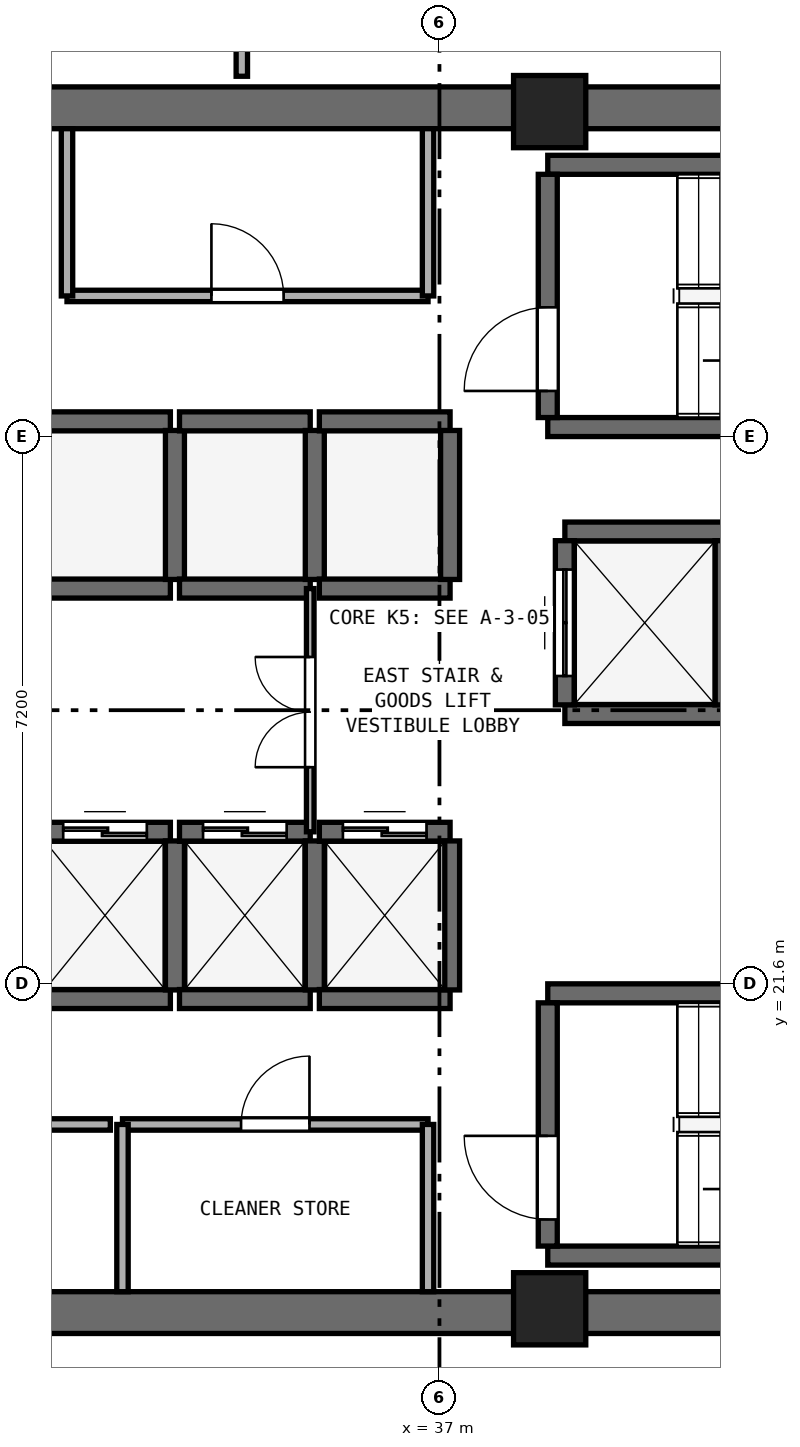
"""IFC4 building model, lengths in metres.
Left out: names, types, materials, properties, quantities, classifications, styles, units other than length and angle.
Written with IfcOpenShell. Run it as: python <this file> out.ifc"""

import sys

from ifc_helpers import new_model, si_unit, direction, frame, frame_2d, origin, origin_2d, place, context, subcontext, project, spatial, rectangle, extrude, element, fill, save


model = new_model("IFC4")
c1 = context("Model", 3, precision=1e-05, world=origin(), true_north=direction((0.0, 1.0)))
c2 = subcontext(c1, "Body", "Model", "MODEL_VIEW")
j1 = project(units=[si_unit("LENGTHUNIT", "METRE"), si_unit("PLANEANGLEUNIT", "RADIAN")], contexts=[c1])
p1 = place(None, origin())
s1 = spatial("IfcSite", under=j1, at=p1, CompositionType="ELEMENT")
p2 = place(p1, origin())
s2 = spatial("IfcBuilding", under=s1, at=p2, CompositionType="ELEMENT")
p3 = place(p2, frame((0.0, 0.0, 189.6)))
s3 = spatial("IfcBuildingStorey", under=s2, at=p3, CompositionType="ELEMENT", Elevation=189.6)
for number, where, z_axis, x_axis in (
    (1, (25.4, 17.275, 0.0), (0.0, 0.0, 1.0), (1.0, 0.0, 0.0)),
    (2, (25.4, 33.125, 0.0), (0.0, 0.0, 1.0), (1.0, 0.0, 0.0)),
):
    element("IfcWall", number, at=place(p3, frame(where, z_axis=z_axis, x_axis=x_axis)), inside=s3, PredefinedType="SHEAR", context=c2, shape_type="SweptSolid", body=[
        extrude(rectangle(XDim=23.2, YDim=0.55, at=frame_2d((11.6, 0.0))), origin(), (0.0, 0.0, 1.0), 3.54),
    ])
for number, where, z_axis, x_axis in (
    (3, (38.45, 17.325, 0.0), (0.0, 0.0, 1.0), (1.0, 0.0, 0.0)),
    (4, (38.45, 33.075, 0.0), (0.0, 0.0, 1.0), (1.0, 0.0, 0.0)),
):
    element("IfcColumn", number, at=place(p3, frame(where, z_axis=z_axis, x_axis=x_axis)), inside=s3, PredefinedType="PILASTER", context=c2, shape_type="SweptSolid", body=[
        extrude(rectangle(XDim=0.95, YDim=0.95, at=origin_2d()), origin(), (0.0, 0.0, 1.0), 3.8),
    ])
for number, where, z_axis, x_axis in (
    (5, (38.425, 28.925, 0.0), (0.0, 0.0, 1.0), (1.0, 0.0, 0.0)),
    (6, (38.425, 32.375, 0.0), (0.0, 0.0, 1.0), (1.0, 0.0, 0.0)),
):
    element("IfcWall", number, at=place(p3, frame(where, z_axis=z_axis, x_axis=x_axis)), inside=s3, PredefinedType="SHEAR", context=c2, shape_type="SweptSolid", body=[
        extrude(rectangle(XDim=7.3, YDim=0.25, at=frame_2d((3.65, 0.0))), origin(), (0.0, 0.0, 1.0), 3.54),
    ])
p4 = place(p3, frame((38.425, 29.05, 0.0), z_axis=(0.0, 0.0, 1.0), x_axis=(0.0, 1.0, 0.0)))
e7 = element("IfcWall", 7, at=p4, inside=s3, PredefinedType="SHEAR", context=c2, shape_type="SweptSolid", body=[
    extrude(rectangle(XDim=3.2, YDim=0.25, at=frame_2d((1.6, 0.0))), origin(), (0.0, 0.0, 1.0), 3.54),
])
p5 = place(p4, frame((0.35, 0.0, 0.0)))
e8 = element("IfcOpeningElement", 8, at=p5, cuts=e7, PredefinedType="OPENING", context=c2, shape_type="SweptSolid", body=[
    extrude(rectangle(XDim=1.1, YDim=2.15, at=frame_2d((0.55, 1.075))), frame((0.0, 0.135, 0.0), z_axis=(0.0, -1.0, 0.0), x_axis=(1.0, 0.0, 0.0)), (0.0, 0.0, 1.0), 0.27),
])
for number, where, z_axis, x_axis in (
    (9, (38.425, 18.025, 0.0), (0.0, 0.0, 1.0), (1.0, 0.0, 0.0)),
    (10, (38.425, 21.475, 0.0), (0.0, 0.0, 1.0), (1.0, 0.0, 0.0)),
):
    element("IfcWall", number, at=place(p3, frame(where, z_axis=z_axis, x_axis=x_axis)), inside=s3, PredefinedType="SHEAR", context=c2, shape_type="SweptSolid", body=[
        extrude(rectangle(XDim=7.3, YDim=0.25, at=frame_2d((3.65, 0.0))), origin(), (0.0, 0.0, 1.0), 3.54),
    ])
p6 = place(p3, frame((38.425, 18.15, 0.0), z_axis=(0.0, 0.0, 1.0), x_axis=(0.0, 1.0, 0.0)))
e11 = element("IfcWall", 11, at=p6, inside=s3, PredefinedType="SHEAR", context=c2, shape_type="SweptSolid", body=[
    extrude(rectangle(XDim=3.2, YDim=0.25, at=frame_2d((1.6, 0.0))), origin(), (0.0, 0.0, 1.0), 3.54),
])
p7 = place(p6, frame((0.35, 0.0, 0.0)))
e12 = element("IfcOpeningElement", 12, at=p7, cuts=e11, PredefinedType="OPENING", context=c2, shape_type="SweptSolid", body=[
    extrude(rectangle(XDim=1.1, YDim=2.15, at=frame_2d((0.55, 1.075))), frame((0.0, 0.135, 0.0), z_axis=(0.0, -1.0, 0.0), x_axis=(1.0, 0.0, 0.0)), (0.0, 0.0, 1.0), 0.27),
])
p8 = place(p3, frame((31.74, 21.4, 0.0), z_axis=(0.0, 0.0, 1.0), x_axis=(1.0, 0.0, 0.0)))
e13 = element("IfcWall", 13, at=p8, inside=s3, PredefinedType="SHEAR", context=c2, shape_type="SweptSolid", body=[
    extrude(rectangle(XDim=1.72, YDim=0.25, at=frame_2d((0.86, 0.0))), origin(), (0.0, 0.0, 1.0), 3.54),
])
p9 = place(p3, frame((31.74, 23.6, 0.0), z_axis=(0.0, 0.0, 1.0), x_axis=(1.0, 0.0, 0.0)))
e14 = element("IfcWall", 14, at=p9, inside=s3, PredefinedType="SHEAR", context=c2, shape_type="SweptSolid", body=[
    extrude(rectangle(XDim=1.72, YDim=0.25, at=frame_2d((0.86, 0.0))), origin(), (0.0, 0.0, 1.0), 3.54),
])
p10 = place(p9, frame((0.31, 0.0, 0.0)))
e15 = element("IfcOpeningElement", 15, at=p10, cuts=e14, PredefinedType="OPENING", context=c2, shape_type="SweptSolid", body=[
    extrude(rectangle(XDim=1.1, YDim=2.15, at=frame_2d((0.55, 1.075))), frame((0.0, 0.135, 0.0), z_axis=(0.0, -1.0, 0.0), x_axis=(1.0, 0.0, 0.0)), (0.0, 0.0, 1.0), 0.27),
])
p11 = place(p3, frame((33.52, 21.52, 0.0), z_axis=(0.0, 0.0, 1.0), x_axis=(0.0, 1.0, 0.0)))
e16 = element("IfcWall", 16, at=p11, inside=s3, PredefinedType="SHEAR", context=c2, shape_type="SweptSolid", body=[
    extrude(rectangle(XDim=1.96, YDim=0.25, at=frame_2d((0.98, 0.0))), origin(), (0.0, 0.0, 1.0), 3.54),
])
p12 = place(p3, frame((33.58, 21.4, 0.0), z_axis=(0.0, 0.0, 1.0), x_axis=(1.0, 0.0, 0.0)))
e17 = element("IfcWall", 17, at=p12, inside=s3, PredefinedType="SHEAR", context=c2, shape_type="SweptSolid", body=[
    extrude(rectangle(XDim=1.72, YDim=0.25, at=frame_2d((0.86, 0.0))), origin(), (0.0, 0.0, 1.0), 3.54),
])
p13 = place(p3, frame((33.58, 23.6, 0.0), z_axis=(0.0, 0.0, 1.0), x_axis=(1.0, 0.0, 0.0)))
e18 = element("IfcWall", 18, at=p13, inside=s3, PredefinedType="SHEAR", context=c2, shape_type="SweptSolid", body=[
    extrude(rectangle(XDim=1.72, YDim=0.25, at=frame_2d((0.86, 0.0))), origin(), (0.0, 0.0, 1.0), 3.54),
])
p14 = place(p13, frame((0.31, 0.0, 0.0)))
e19 = element("IfcOpeningElement", 19, at=p14, cuts=e18, PredefinedType="OPENING", context=c2, shape_type="SweptSolid", body=[
    extrude(rectangle(XDim=1.1, YDim=2.15, at=frame_2d((0.55, 1.075))), frame((0.0, 0.135, 0.0), z_axis=(0.0, -1.0, 0.0), x_axis=(1.0, 0.0, 0.0)), (0.0, 0.0, 1.0), 0.27),
])
p15 = place(p3, frame((35.36, 21.52, 0.0), z_axis=(0.0, 0.0, 1.0), x_axis=(0.0, 1.0, 0.0)))
e20 = element("IfcWall", 20, at=p15, inside=s3, PredefinedType="SHEAR", context=c2, shape_type="SweptSolid", body=[
    extrude(rectangle(XDim=1.96, YDim=0.25, at=frame_2d((0.98, 0.0))), origin(), (0.0, 0.0, 1.0), 3.54),
])
p16 = place(p3, frame((35.42, 21.4, 0.0), z_axis=(0.0, 0.0, 1.0), x_axis=(1.0, 0.0, 0.0)))
e21 = element("IfcWall", 21, at=p16, inside=s3, PredefinedType="SHEAR", context=c2, shape_type="SweptSolid", body=[
    extrude(rectangle(XDim=1.72, YDim=0.25, at=frame_2d((0.86, 0.0))), origin(), (0.0, 0.0, 1.0), 3.54),
])
p17 = place(p3, frame((35.42, 23.6, 0.0), z_axis=(0.0, 0.0, 1.0), x_axis=(1.0, 0.0, 0.0)))
e22 = element("IfcWall", 22, at=p17, inside=s3, PredefinedType="SHEAR", context=c2, shape_type="SweptSolid", body=[
    extrude(rectangle(XDim=1.72, YDim=0.25, at=frame_2d((0.86, 0.0))), origin(), (0.0, 0.0, 1.0), 3.54),
])
p18 = place(p17, frame((0.31, 0.0, 0.0)))
e23 = element("IfcOpeningElement", 23, at=p18, cuts=e22, PredefinedType="OPENING", context=c2, shape_type="SweptSolid", body=[
    extrude(rectangle(XDim=1.1, YDim=2.15, at=frame_2d((0.55, 1.075))), frame((0.0, 0.135, 0.0), z_axis=(0.0, -1.0, 0.0), x_axis=(1.0, 0.0, 0.0)), (0.0, 0.0, 1.0), 0.27),
])
p19 = place(p3, frame((37.14, 21.52, 0.0), z_axis=(0.0, 0.0, 1.0), x_axis=(0.0, 1.0, 0.0)))
e24 = element("IfcWall", 24, at=p19, inside=s3, PredefinedType="SHEAR", context=c2, shape_type="SweptSolid", body=[
    extrude(rectangle(XDim=1.96, YDim=0.25, at=frame_2d((0.98, 0.0))), origin(), (0.0, 0.0, 1.0), 3.54),
])
for number, where, z_axis, x_axis in (
    (25, (31.74, 26.8, 0.0), (0.0, 0.0, 1.0), (1.0, 0.0, 0.0)),
    (26, (31.74, 29.0, 0.0), (0.0, 0.0, 1.0), (1.0, 0.0, 0.0)),
):
    element("IfcWall", number, at=place(p3, frame(where, z_axis=z_axis, x_axis=x_axis)), inside=s3, PredefinedType="SHEAR", context=c2, shape_type="SweptSolid", body=[
        extrude(rectangle(XDim=1.72, YDim=0.25, at=frame_2d((0.86, 0.0))), origin(), (0.0, 0.0, 1.0), 3.54),
    ])
p20 = place(p3, frame((33.52, 26.92, 0.0), z_axis=(0.0, 0.0, 1.0), x_axis=(0.0, 1.0, 0.0)))
e27 = element("IfcWall", 27, at=p20, inside=s3, PredefinedType="SHEAR", context=c2, shape_type="SweptSolid", body=[
    extrude(rectangle(XDim=1.96, YDim=0.25, at=frame_2d((0.98, 0.0))), origin(), (0.0, 0.0, 1.0), 3.54),
])
for number, where, z_axis, x_axis in (
    (28, (33.58, 26.8, 0.0), (0.0, 0.0, 1.0), (1.0, 0.0, 0.0)),
    (29, (33.58, 29.0, 0.0), (0.0, 0.0, 1.0), (1.0, 0.0, 0.0)),
):
    element("IfcWall", number, at=place(p3, frame(where, z_axis=z_axis, x_axis=x_axis)), inside=s3, PredefinedType="SHEAR", context=c2, shape_type="SweptSolid", body=[
        extrude(rectangle(XDim=1.72, YDim=0.25, at=frame_2d((0.86, 0.0))), origin(), (0.0, 0.0, 1.0), 3.54),
    ])
p21 = place(p3, frame((35.36, 26.92, 0.0), z_axis=(0.0, 0.0, 1.0), x_axis=(0.0, 1.0, 0.0)))
e30 = element("IfcWall", 30, at=p21, inside=s3, PredefinedType="SHEAR", context=c2, shape_type="SweptSolid", body=[
    extrude(rectangle(XDim=1.96, YDim=0.25, at=frame_2d((0.98, 0.0))), origin(), (0.0, 0.0, 1.0), 3.54),
])
for number, where, z_axis, x_axis in (
    (31, (35.42, 26.8, 0.0), (0.0, 0.0, 1.0), (1.0, 0.0, 0.0)),
    (32, (35.42, 29.0, 0.0), (0.0, 0.0, 1.0), (1.0, 0.0, 0.0)),
):
    element("IfcWall", number, at=place(p3, frame(where, z_axis=z_axis, x_axis=x_axis)), inside=s3, PredefinedType="SHEAR", context=c2, shape_type="SweptSolid", body=[
        extrude(rectangle(XDim=1.72, YDim=0.25, at=frame_2d((0.86, 0.0))), origin(), (0.0, 0.0, 1.0), 3.54),
    ])
p22 = place(p3, frame((37.14, 26.92, 0.0), z_axis=(0.0, 0.0, 1.0), x_axis=(0.0, 1.0, 0.0)))
e33 = element("IfcWall", 33, at=p22, inside=s3, PredefinedType="SHEAR", context=c2, shape_type="SweptSolid", body=[
    extrude(rectangle(XDim=1.96, YDim=0.25, at=frame_2d((0.98, 0.0))), origin(), (0.0, 0.0, 1.0), 3.54),
])
for number, where, z_axis, x_axis in (
    (34, (38.65, 25.15, 0.0), (0.0, 0.0, 1.0), (1.0, 0.0, 0.0)),
    (35, (38.65, 27.55, 0.0), (0.0, 0.0, 1.0), (1.0, 0.0, 0.0)),
):
    element("IfcWall", number, at=place(p3, frame(where, z_axis=z_axis, x_axis=x_axis)), inside=s3, PredefinedType="SHEAR", context=c2, shape_type="SweptSolid", body=[
        extrude(rectangle(XDim=2.1, YDim=0.25, at=frame_2d((1.05, 0.0))), origin(), (0.0, 0.0, 1.0), 3.54),
    ])
p23 = place(p3, frame((38.65, 25.27, 0.0), z_axis=(0.0, 0.0, 1.0), x_axis=(0.0, 1.0, 0.0)))
e36 = element("IfcWall", 36, at=p23, inside=s3, PredefinedType="SHEAR", context=c2, shape_type="SweptSolid", body=[
    extrude(rectangle(XDim=2.16, YDim=0.25, at=frame_2d((1.08, 0.0))), origin(), (0.0, 0.0, 1.0), 3.54),
])
p24 = place(p23, frame((0.38, 0.0, 0.0)))
e37 = element("IfcOpeningElement", 37, at=p24, cuts=e36, PredefinedType="OPENING", context=c2, shape_type="SweptSolid", body=[
    extrude(rectangle(XDim=1.4, YDim=2.2, at=frame_2d((0.7, 1.1))), frame((0.0, 0.135, 0.0), z_axis=(0.0, -1.0, 0.0), x_axis=(1.0, 0.0, 0.0)), (0.0, 0.0, 1.0), 0.27),
])
p25 = place(p3, frame((40.75, 25.27, 0.0), z_axis=(0.0, 0.0, 1.0), x_axis=(0.0, 1.0, 0.0)))
e38 = element("IfcWall", 38, at=p25, inside=s3, PredefinedType="SHEAR", context=c2, shape_type="SweptSolid", body=[
    extrude(rectangle(XDim=2.16, YDim=0.25, at=frame_2d((1.08, 0.0))), origin(), (0.0, 0.0, 1.0), 3.54),
])
p26 = place(p3, frame((32.1, 30.65, 0.0), z_axis=(0.0, 0.0, 1.0), x_axis=(1.0, 0.0, 0.0)))
e39 = element("IfcWall", 39, at=p26, inside=s3, PredefinedType="PARTITIONING", context=c2, shape_type="SweptSolid", body=[
    extrude(rectangle(XDim=4.75, YDim=0.15, at=frame_2d((2.375, 0.0))), origin(), (0.0, 0.0, 1.0), 3.54),
])
p27 = place(p26, frame((1.9, 0.0, 0.0)))
e40 = element("IfcOpeningElement", 40, at=p27, cuts=e39, PredefinedType="OPENING", context=c2, shape_type="SweptSolid", body=[
    extrude(rectangle(XDim=0.95, YDim=2.1, at=frame_2d((0.475, 1.05))), frame((0.0, 0.085, 0.0), z_axis=(0.0, -1.0, 0.0), x_axis=(1.0, 0.0, 0.0)), (0.0, 0.0, 1.0), 0.17),
])
for number, where, z_axis, x_axis in (
    (41, (32.1, 30.65, 0.0), (0.0, 0.0, 1.0), (0.0, 1.0, 0.0)),
    (42, (36.85, 30.65, 0.0), (0.0, 0.0, 1.0), (0.0, 1.0, 0.0)),
):
    element("IfcWall", number, at=place(p3, frame(where, z_axis=z_axis, x_axis=x_axis)), inside=s3, PredefinedType="PARTITIONING", context=c2, shape_type="SweptSolid", body=[
        extrude(rectangle(XDim=2.2, YDim=0.15, at=frame_2d((1.1, 0.0))), origin(), (0.0, 0.0, 1.0), 3.54),
    ])
p28 = place(p3, frame((29.43, 19.75, 0.0), z_axis=(0.0, 0.0, 1.0), x_axis=(1.0, 0.0, 0.0)))
e43 = element("IfcWall", 43, at=p28, inside=s3, PredefinedType="PARTITIONING", context=c2, shape_type="SweptSolid", body=[
    extrude(rectangle(XDim=3.24, YDim=0.15, at=frame_2d((1.62, 0.0))), origin(), (0.0, 0.0, 1.0), 3.54),
])
p29 = place(p28, frame((1.145, 0.0, 0.0)))
e44 = element("IfcOpeningElement", 44, at=p29, cuts=e43, PredefinedType="OPENING", context=c2, shape_type="SweptSolid", body=[
    extrude(rectangle(XDim=0.95, YDim=2.1, at=frame_2d((0.475, 1.05))), frame((0.0, 0.085, 0.0), z_axis=(0.0, -1.0, 0.0), x_axis=(1.0, 0.0, 0.0)), (0.0, 0.0, 1.0), 0.17),
])
p30 = place(p3, frame((32.83, 19.75, 0.0), z_axis=(0.0, 0.0, 1.0), x_axis=(1.0, 0.0, 0.0)))
e45 = element("IfcWall", 45, at=p30, inside=s3, PredefinedType="PARTITIONING", context=c2, shape_type="SweptSolid", body=[
    extrude(rectangle(XDim=4.02, YDim=0.15, at=frame_2d((2.01, 0.0))), origin(), (0.0, 0.0, 1.0), 3.54),
])
p31 = place(p30, frame((1.56, 0.0, 0.0)))
e46 = element("IfcOpeningElement", 46, at=p31, cuts=e45, PredefinedType="OPENING", context=c2, shape_type="SweptSolid", body=[
    extrude(rectangle(XDim=0.9, YDim=2.1, at=frame_2d((0.45, 1.05))), frame((0.0, 0.085, 0.0), z_axis=(0.0, -1.0, 0.0), x_axis=(1.0, 0.0, 0.0)), (0.0, 0.0, 1.0), 0.17),
])
for number, where, z_axis, x_axis in (
    (47, (32.83, 17.55, 0.0), (0.0, 0.0, 1.0), (0.0, 1.0, 0.0)),
    (48, (36.85, 17.55, 0.0), (0.0, 0.0, 1.0), (0.0, 1.0, 0.0)),
):
    element("IfcWall", number, at=place(p3, frame(where, z_axis=z_axis, x_axis=x_axis)), inside=s3, PredefinedType="PARTITIONING", context=c2, shape_type="SweptSolid", body=[
        extrude(rectangle(XDim=2.2, YDim=0.15, at=frame_2d((1.1, 0.0))), origin(), (0.0, 0.0, 1.0), 3.54),
    ])
p32 = place(p3, frame((35.3, 23.6, 0.0), z_axis=(0.0, 0.0, 1.0), x_axis=(0.0, 1.0, 0.0)))
e49 = element("IfcWall", 49, at=p32, inside=s3, PredefinedType="PARTITIONING", context=c2, shape_type="SweptSolid", body=[
    extrude(rectangle(XDim=3.2, YDim=0.1, at=frame_2d((1.6, 0.0))), origin(), (0.0, 0.0, 1.0), 3.54),
])
p33 = place(p32, frame((0.85, 0.0, 0.0)))
e50 = element("IfcOpeningElement", 50, at=p33, cuts=e49, PredefinedType="OPENING", context=c2, shape_type="SweptSolid", body=[
    extrude(rectangle(XDim=1.45, YDim=2.12, at=frame_2d((0.725, 1.06))), frame((0.0, 0.06, 0.0), z_axis=(0.0, -1.0, 0.0), x_axis=(1.0, 0.0, 0.0)), (0.0, 0.0, 1.0), 0.12),
])
p34 = place(p3, frame((34.4, 33.54, 0.0), z_axis=(0.0, 0.0, 1.0), x_axis=(0.0, 1.0, 0.0)))
e51 = element("IfcWall", 51, at=p34, inside=s3, PredefinedType="PARTITIONING", context=c2, shape_type="SweptSolid", body=[
    extrude(rectangle(XDim=2.76, YDim=0.15, at=frame_2d((1.38, 0.0))), origin(), (0.0, 0.0, 1.0), 3.54),
])
p35 = place(p5, origin())
e52 = element("IfcDoor", 52, at=p35, inside=s3, OperationType="SINGLE_SWING_LEFT", PredefinedType="DOOR", context=c2, shape_type="SweptSolid", body=[
    extrude(rectangle(XDim=1.1, YDim=2.15, at=frame_2d((0.55, 1.075))), frame((0.0, 0.025, 0.0), z_axis=(0.0, -1.0, 0.0), x_axis=(1.0, 0.0, 0.0)), (0.0, 0.0, 1.0), 0.05),
])
fill(e8, e52)
p36 = place(p7, origin())
e53 = element("IfcDoor", 53, at=p36, inside=s3, OperationType="SINGLE_SWING_RIGHT", PredefinedType="DOOR", context=c2, shape_type="SweptSolid", body=[
    extrude(rectangle(XDim=1.1, YDim=2.15, at=frame_2d((0.55, 1.075))), frame((0.0, 0.025, 0.0), z_axis=(0.0, -1.0, 0.0), x_axis=(1.0, 0.0, 0.0)), (0.0, 0.0, 1.0), 0.05),
])
fill(e12, e53)
p37 = place(p10, origin())
e54 = element("IfcDoor", 54, at=p37, inside=s3, OperationType="DOUBLE_DOOR_SLIDING", PredefinedType="DOOR", context=c2, shape_type="SweptSolid", body=[
    extrude(rectangle(XDim=1.1, YDim=2.15, at=frame_2d((0.55, 1.075))), frame((0.0, 0.025, 0.0), z_axis=(0.0, -1.0, 0.0), x_axis=(1.0, 0.0, 0.0)), (0.0, 0.0, 1.0), 0.05),
])
fill(e15, e54)
p38 = place(p14, origin())
e55 = element("IfcDoor", 55, at=p38, inside=s3, OperationType="DOUBLE_DOOR_SLIDING", PredefinedType="DOOR", context=c2, shape_type="SweptSolid", body=[
    extrude(rectangle(XDim=1.1, YDim=2.15, at=frame_2d((0.55, 1.075))), frame((0.0, 0.025, 0.0), z_axis=(0.0, -1.0, 0.0), x_axis=(1.0, 0.0, 0.0)), (0.0, 0.0, 1.0), 0.05),
])
fill(e19, e55)
p39 = place(p18, origin())
e56 = element("IfcDoor", 56, at=p39, inside=s3, OperationType="DOUBLE_DOOR_SLIDING", PredefinedType="DOOR", context=c2, shape_type="SweptSolid", body=[
    extrude(rectangle(XDim=1.1, YDim=2.15, at=frame_2d((0.55, 1.075))), frame((0.0, 0.025, 0.0), z_axis=(0.0, -1.0, 0.0), x_axis=(1.0, 0.0, 0.0)), (0.0, 0.0, 1.0), 0.05),
])
fill(e23, e56)
p40 = place(p24, origin())
e57 = element("IfcDoor", 57, at=p40, inside=s3, OperationType="DOUBLE_DOOR_SLIDING", PredefinedType="DOOR", context=c2, shape_type="SweptSolid", body=[
    extrude(rectangle(XDim=1.4, YDim=2.2, at=frame_2d((0.7, 1.1))), frame((0.0, 0.025, 0.0), z_axis=(0.0, -1.0, 0.0), x_axis=(1.0, 0.0, 0.0)), (0.0, 0.0, 1.0), 0.05),
])
fill(e37, e57)
p41 = place(p27, origin())
e58 = element("IfcDoor", 58, at=p41, inside=s3, OperationType="SINGLE_SWING_LEFT", PredefinedType="DOOR", context=c2, shape_type="SweptSolid", body=[
    extrude(rectangle(XDim=0.95, YDim=2.1, at=frame_2d((0.475, 1.05))), frame((0.0, 0.025, 0.0), z_axis=(0.0, -1.0, 0.0), x_axis=(1.0, 0.0, 0.0)), (0.0, 0.0, 1.0), 0.05),
])
fill(e40, e58)
p42 = place(p31, origin())
e59 = element("IfcDoor", 59, at=p42, inside=s3, OperationType="SINGLE_SWING_RIGHT", PredefinedType="DOOR", context=c2, shape_type="SweptSolid", body=[
    extrude(rectangle(XDim=0.9, YDim=2.1, at=frame_2d((0.45, 1.05))), frame((0.0, 0.025, 0.0), z_axis=(0.0, -1.0, 0.0), x_axis=(1.0, 0.0, 0.0)), (0.0, 0.0, 1.0), 0.05),
])
fill(e46, e59)
p43 = place(p33, origin())
e60 = element("IfcDoor", 60, at=p43, inside=s3, OperationType="DOUBLE_DOOR_SINGLE_SWING", PredefinedType="DOOR", context=c2, shape_type="SweptSolid", body=[
    extrude(rectangle(XDim=1.45, YDim=2.12, at=frame_2d((0.725, 1.06))), frame((0.0, 0.025, 0.0), z_axis=(0.0, -1.0, 0.0), x_axis=(1.0, 0.0, 0.0)), (0.0, 0.0, 1.0), 0.05),
])
fill(e50, e60)
save(model, sys.argv[1])
